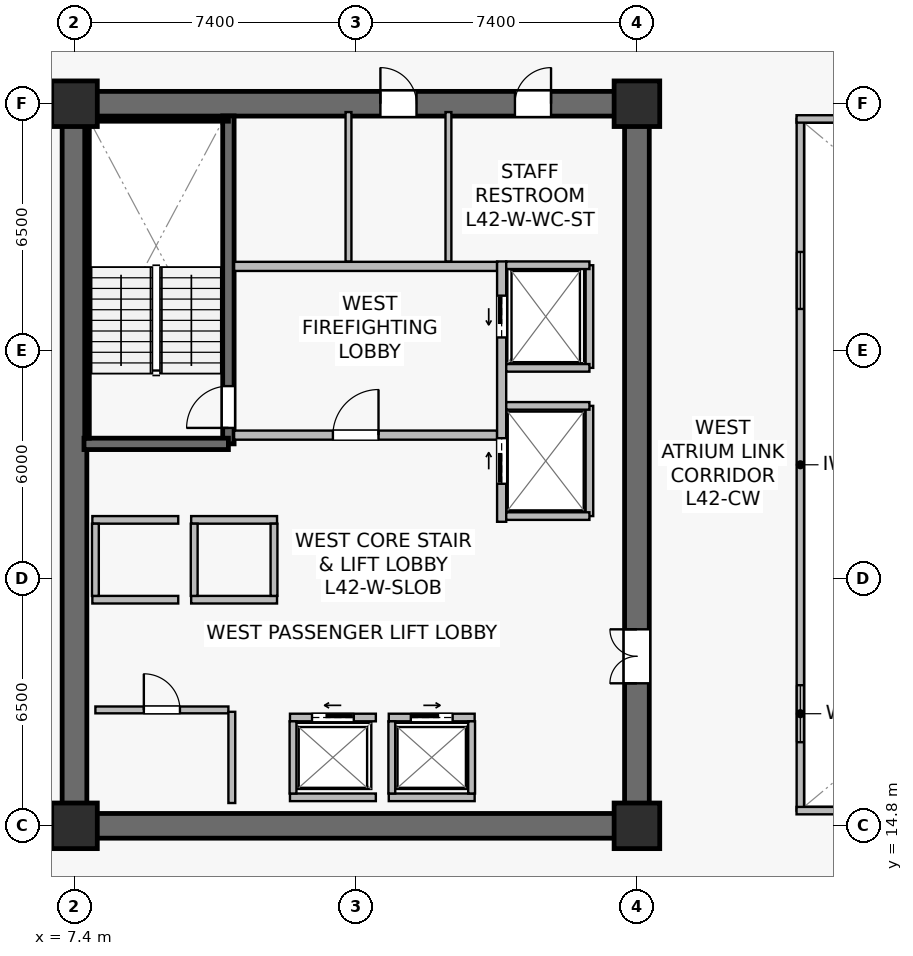
"""IFC4 building model, lengths in metres.
Left out: names, types, materials, properties, quantities, classifications, styles, units other than length and angle.
Written with IfcOpenShell. Run it as: python <this file> out.ifc"""

import sys

from ifc_helpers import new_model, si_unit, direction, frame, frame_2d, origin, origin_2d, place, context, subcontext, project, spatial, rectangle, extrude, source, transform, mapped, element, fill, save


model = new_model("IFC4")
c1 = context("Model", 3, precision=1e-05, world=origin(), true_north=direction((0.0, 1.0)))
c2 = subcontext(c1, "Body", "Model", "MODEL_VIEW")
j1 = project(units=[si_unit("LENGTHUNIT", "METRE"), si_unit("PLANEANGLEUNIT", "RADIAN")], contexts=[c1])
p1 = place(None, origin())
s1 = spatial("IfcSite", under=j1, at=p1, CompositionType="ELEMENT")
p2 = place(p1, origin())
s2 = spatial("IfcBuilding", under=s1, at=p2, CompositionType="ELEMENT")
p3 = place(p2, frame((0.0, 0.0, 174.8)))
s3 = spatial("IfcBuildingStorey", under=s2, at=p3, CompositionType="ELEMENT", Elevation=174.8)
p4 = place(p3, frame((7.075, 14.8, 0.0), z_axis=(0.0, 0.0, 1.0), x_axis=(1.0, 0.0, 0.0)))
e1 = element("IfcWall", 1, at=p4, inside=s3, PredefinedType="SHEAR", context=c2, shape_type="SweptSolid", body=[
    extrude(rectangle(XDim=15.45, YDim=0.65, at=frame_2d((7.725, 0.0))), origin(), (0.0, 0.0, 1.0), 3.79),
])
p5 = place(p3, frame((7.075, 33.8, 0.0), z_axis=(0.0, 0.0, 1.0), x_axis=(1.0, 0.0, 0.0)))
e2 = element("IfcWall", 2, at=p5, inside=s3, PredefinedType="SHEAR", context=c2, shape_type="SweptSolid", body=[
    extrude(rectangle(XDim=15.45, YDim=0.65, at=frame_2d((7.725, 0.0))), origin(), (0.0, 0.0, 1.0), 3.79),
])
p6 = place(p5, frame((8.375, 0.0, 0.0)))
e3 = element("IfcOpeningElement", 3, at=p6, cuts=e2, PredefinedType="OPENING", context=c2, shape_type="SweptSolid", body=[
    extrude(rectangle(XDim=0.95, YDim=2.15, at=frame_2d((0.475, 1.075))), frame((0.0, 0.335, 0.0), z_axis=(0.0, -1.0, 0.0), x_axis=(1.0, 0.0, 0.0)), (0.0, 0.0, 1.0), 0.67),
])
p7 = place(p5, frame((11.915, 0.0, 0.0)))
e4 = element("IfcOpeningElement", 4, at=p7, cuts=e2, PredefinedType="OPENING", context=c2, shape_type="SweptSolid", body=[
    extrude(rectangle(XDim=0.95, YDim=2.15, at=frame_2d((0.475, 1.075))), frame((0.0, 0.335, 0.0), z_axis=(0.0, -1.0, 0.0), x_axis=(1.0, 0.0, 0.0)), (0.0, 0.0, 1.0), 0.67),
])
p8 = place(p3, frame((7.4, 15.125, 0.0), z_axis=(0.0, 0.0, 1.0), x_axis=(0.0, 1.0, 0.0)))
e5 = element("IfcWall", 5, at=p8, inside=s3, PredefinedType="SHEAR", context=c2, shape_type="SweptSolid", body=[
    extrude(rectangle(XDim=18.35, YDim=0.65, at=frame_2d((9.175, 0.0))), origin(), (0.0, 0.0, 1.0), 3.79),
])
p9 = place(p3, frame((22.2, 15.125, 0.0), z_axis=(0.0, 0.0, 1.0), x_axis=(0.0, 1.0, 0.0)))
e6 = element("IfcWall", 6, at=p9, inside=s3, PredefinedType="SHEAR", context=c2, shape_type="SweptSolid", body=[
    extrude(rectangle(XDim=18.35, YDim=0.65, at=frame_2d((9.175, 0.0))), origin(), (0.0, 0.0, 1.0), 3.79),
])
p10 = place(p9, frame((3.425, 0.0, 0.0)))
e7 = element("IfcOpeningElement", 7, at=p10, cuts=e6, PredefinedType="OPENING", context=c2, shape_type="SweptSolid", body=[
    extrude(rectangle(XDim=1.42, YDim=2.2, at=frame_2d((0.71, 1.1))), frame((0.0, 0.335, 0.0), z_axis=(0.0, -1.0, 0.0), x_axis=(1.0, 0.0, 0.0)), (0.0, 0.0, 1.0), 0.67),
])
p11 = place(p3, frame((11.45, 24.85, 0.0), z_axis=(0.0, 0.0, 1.0), x_axis=(0.0, 1.0, 0.0)))
e8 = element("IfcWall", 8, at=p11, inside=s3, PredefinedType="SHEAR", context=c2, shape_type="SweptSolid", body=[
    extrude(rectangle(XDim=8.63, YDim=0.3, at=frame_2d((4.315, 0.0))), origin(), (0.0, 0.0, 1.0), 3.79),
])
p12 = place(p11, frame((0.42, 0.0, 0.0)))
e9 = element("IfcOpeningElement", 9, at=p12, cuts=e8, PredefinedType="OPENING", context=c2, shape_type="SweptSolid", body=[
    extrude(rectangle(XDim=1.1, YDim=2.15, at=frame_2d((0.55, 1.075))), frame((0.0, 0.16, 0.0), z_axis=(0.0, -1.0, 0.0), x_axis=(1.0, 0.0, 0.0)), (0.0, 0.0, 1.0), 0.32),
])
p13 = place(p3, frame((7.65, 24.85, 0.0), z_axis=(0.0, 0.0, 1.0), x_axis=(1.0, 0.0, 0.0)))
e10 = element("IfcWall", 10, at=p13, inside=s3, PredefinedType="SHEAR", context=c2, shape_type="SweptSolid", body=[
    extrude(rectangle(XDim=3.8, YDim=0.3, at=frame_2d((1.9, 0.0))), origin(), (0.0, 0.0, 1.0), 3.79),
])
p14 = place(p3, frame((7.73, 33.4, 0.0), z_axis=(0.0, 0.0, 1.0), x_axis=(1.0, 0.0, 0.0)))
e11 = element("IfcWall", 11, at=p14, inside=s3, PredefinedType="SOLIDWALL", context=c2, shape_type="SweptSolid", body=[
    extrude(rectangle(XDim=3.72, YDim=0.12, at=frame_2d((1.86, 0.0))), origin(), (0.0, 0.0, 1.0), 3.79),
])
p15 = place(p3, frame((7.73, 25.0, 0.0), z_axis=(0.0, 0.0, 1.0), x_axis=(0.0, 1.0, 0.0)))
e12 = element("IfcWall", 12, at=p15, inside=s3, PredefinedType="SOLIDWALL", context=c2, shape_type="SweptSolid", body=[
    extrude(rectangle(XDim=8.32, YDim=0.12, at=frame_2d((4.16, 0.0))), origin(), (0.0, 0.0, 1.0), 3.79),
])
m1 = source(origin(), c2, "Body", "SweptSolid", [
    extrude(rectangle(XDim=1.2, YDim=1.2, at=origin_2d()), origin(), (0.0, 0.0, 1.0), 4.1),
])
for number, where, z_axis, x_axis in (
    (13, (7.4, 14.8, 0.0), (0.0, 0.0, 1.0), (1.0, 0.0, 0.0)),
    (14, (22.2, 14.8, 0.0), (0.0, 0.0, 1.0), (1.0, 0.0, 0.0)),
    (15, (7.4, 33.8, 0.0), (0.0, 0.0, 1.0), (1.0, 0.0, 0.0)),
    (16, (22.2, 33.8, 0.0), (0.0, 0.0, 1.0), (1.0, 0.0, 0.0)),
):
    element("IfcColumn", number, at=place(p3, frame(where, z_axis=z_axis, x_axis=x_axis)), inside=s3, PredefinedType="COLUMN", context=c2, shape_type="MappedRepresentation", body=[
        mapped(m1, transform((0.0, 0.0, 0.0), scale=1.0)),
    ])
p16 = place(p3, frame((11.6, 25.08, 0.0), z_axis=(0.0, 0.0, 1.0), x_axis=(1.0, 0.0, 0.0)))
e17 = element("IfcWall", 17, at=p16, inside=s3, PredefinedType="SOLIDWALL", context=c2, shape_type="SweptSolid", body=[
    extrude(rectangle(XDim=6.92, YDim=0.24, at=frame_2d((3.46, 0.0))), origin(), (0.0, 0.0, 1.0), 3.187),
])
p17 = place(p16, frame((2.6, 0.0, 0.0)))
e18 = element("IfcOpeningElement", 18, at=p17, cuts=e17, PredefinedType="OPENING", context=c2, shape_type="SweptSolid", body=[
    extrude(rectangle(XDim=1.2, YDim=2.16, at=frame_2d((0.6, 1.08))), frame((0.0, 0.13, 0.0), z_axis=(0.0, -1.0, 0.0), x_axis=(1.0, 0.0, 0.0)), (0.0, 0.0, 1.0), 0.26),
])
p18 = place(p3, frame((11.6, 29.52, 0.0), z_axis=(0.0, 0.0, 1.0), x_axis=(1.0, 0.0, 0.0)))
e19 = element("IfcWall", 19, at=p18, inside=s3, PredefinedType="SOLIDWALL", context=c2, shape_type="SweptSolid", body=[
    extrude(rectangle(XDim=6.92, YDim=0.24, at=frame_2d((3.46, 0.0))), origin(), (0.0, 0.0, 1.0), 3.187),
])
p19 = place(p3, frame((18.64, 22.8, 0.0), z_axis=(0.0, 0.0, 1.0), x_axis=(0.0, 1.0, 0.0)))
e20 = element("IfcWall", 20, at=p19, inside=s3, PredefinedType="SOLIDWALL", context=c2, shape_type="SweptSolid", body=[
    extrude(rectangle(XDim=6.85, YDim=0.24, at=frame_2d((3.425, 0.0))), origin(), (0.0, 0.0, 1.0), 2.925),
])
p20 = place(p19, frame((4.85, 0.0, 0.0)))
e21 = element("IfcOpeningElement", 21, at=p20, cuts=e20, PredefinedType="OPENING", context=c2, shape_type="SweptSolid", body=[
    extrude(rectangle(XDim=1.1, YDim=2.22, at=frame_2d((0.55, 1.11))), frame((0.0, 0.13, 0.0), z_axis=(0.0, -1.0, 0.0), x_axis=(1.0, 0.0, 0.0)), (0.0, 0.0, 1.0), 0.26),
])
p21 = place(p19, frame((1.0, 0.0, 0.0)))
e22 = element("IfcOpeningElement", 22, at=p21, cuts=e20, PredefinedType="OPENING", context=c2, shape_type="SweptSolid", body=[
    extrude(rectangle(XDim=1.2, YDim=2.22, at=frame_2d((0.6, 1.11))), frame((0.0, 0.13, 0.0), z_axis=(0.0, -1.0, 0.0), x_axis=(1.0, 0.0, 0.0)), (0.0, 0.0, 1.0), 0.26),
])
p22 = place(p3, frame((13.07, 17.65, 0.0), z_axis=(0.0, 0.0, 1.0), x_axis=(1.0, 0.0, 0.0)))
e23 = element("IfcWall", 23, at=p22, inside=s3, PredefinedType="SOLIDWALL", context=c2, shape_type="SweptSolid", body=[
    extrude(rectangle(XDim=2.26, YDim=0.2, at=frame_2d((1.13, 0.0))), origin(), (0.0, 0.0, 1.0), 3.187),
])
p23 = place(p22, frame((0.58, 0.0, 0.0)))
e24 = element("IfcOpeningElement", 24, at=p23, cuts=e23, PredefinedType="OPENING", context=c2, shape_type="SweptSolid", body=[
    extrude(rectangle(XDim=1.1, YDim=2.22, at=frame_2d((0.55, 1.11))), frame((0.0, 0.11, 0.0), z_axis=(0.0, -1.0, 0.0), x_axis=(1.0, 0.0, 0.0)), (0.0, 0.0, 1.0), 0.22),
])
p24 = place(p3, frame((13.07, 15.55, 0.0), z_axis=(0.0, 0.0, 1.0), x_axis=(1.0, 0.0, 0.0)))
e25 = element("IfcWall", 25, at=p24, inside=s3, PredefinedType="SOLIDWALL", context=c2, shape_type="SweptSolid", body=[
    extrude(rectangle(XDim=2.26, YDim=0.2, at=frame_2d((1.13, 0.0))), origin(), (0.0, 0.0, 1.0), 3.187),
])
p25 = place(p3, frame((13.15, 15.65, 0.0), z_axis=(0.0, 0.0, 1.0), x_axis=(0.0, 1.0, 0.0)))
e26 = element("IfcWall", 26, at=p25, inside=s3, PredefinedType="SOLIDWALL", context=c2, shape_type="SweptSolid", body=[
    extrude(rectangle(XDim=1.9, YDim=0.18, at=frame_2d((0.95, 0.0))), origin(), (0.0, 0.0, 1.0), 3.79),
])
p26 = place(p3, frame((15.67, 17.65, 0.0), z_axis=(0.0, 0.0, 1.0), x_axis=(1.0, 0.0, 0.0)))
e27 = element("IfcWall", 27, at=p26, inside=s3, PredefinedType="SOLIDWALL", context=c2, shape_type="SweptSolid", body=[
    extrude(rectangle(XDim=2.26, YDim=0.2, at=frame_2d((1.13, 0.0))), origin(), (0.0, 0.0, 1.0), 3.79),
])
p27 = place(p26, frame((0.58, 0.0, 0.0)))
e28 = element("IfcOpeningElement", 28, at=p27, cuts=e27, PredefinedType="OPENING", context=c2, shape_type="SweptSolid", body=[
    extrude(rectangle(XDim=1.1, YDim=2.22, at=frame_2d((0.55, 1.11))), frame((0.0, 0.11, 0.0), z_axis=(0.0, -1.0, 0.0), x_axis=(1.0, 0.0, 0.0)), (0.0, 0.0, 1.0), 0.22),
])
p28 = place(p3, frame((15.67, 15.55, 0.0), z_axis=(0.0, 0.0, 1.0), x_axis=(1.0, 0.0, 0.0)))
e29 = element("IfcWall", 29, at=p28, inside=s3, PredefinedType="SOLIDWALL", context=c2, shape_type="SweptSolid", body=[
    extrude(rectangle(XDim=2.26, YDim=0.2, at=frame_2d((1.13, 0.0))), origin(), (0.0, 0.0, 1.0), 3.79),
])
for number, where, z_axis, x_axis in (
    (30, (15.75, 15.65, 0.0), (0.0, 0.0, 1.0), (0.0, 1.0, 0.0)),
    (31, (17.85, 15.65, 0.0), (0.0, 0.0, 1.0), (0.0, 1.0, 0.0)),
):
    element("IfcWall", number, at=place(p3, frame(where, z_axis=z_axis, x_axis=x_axis)), inside=s3, PredefinedType="SOLIDWALL", context=c2, shape_type="SweptSolid", body=[
        extrude(rectangle(XDim=1.9, YDim=0.18, at=frame_2d((0.95, 0.0))), origin(), (0.0, 0.0, 1.0), 3.79),
    ])
for number, where, z_axis, x_axis in (
    (32, (7.87, 20.75, 0.0), (0.0, 0.0, 1.0), (1.0, 0.0, 0.0)),
    (33, (7.87, 22.85, 0.0), (0.0, 0.0, 1.0), (1.0, 0.0, 0.0)),
):
    element("IfcWall", number, at=place(p3, frame(where, z_axis=z_axis, x_axis=x_axis)), inside=s3, PredefinedType="SOLIDWALL", context=c2, shape_type="SweptSolid", body=[
        extrude(rectangle(XDim=2.26, YDim=0.2, at=frame_2d((1.13, 0.0))), origin(), (0.0, 0.0, 1.0), 3.79),
    ])
p29 = place(p3, frame((7.95, 20.85, 0.0), z_axis=(0.0, 0.0, 1.0), x_axis=(0.0, 1.0, 0.0)))
e34 = element("IfcWall", 34, at=p29, inside=s3, PredefinedType="SOLIDWALL", context=c2, shape_type="SweptSolid", body=[
    extrude(rectangle(XDim=1.9, YDim=0.18, at=frame_2d((0.95, 0.0))), origin(), (0.0, 0.0, 1.0), 3.79),
])
for number, where, z_axis, x_axis in (
    (35, (10.47, 20.75, 0.0), (0.0, 0.0, 1.0), (1.0, 0.0, 0.0)),
    (36, (10.47, 22.85, 0.0), (0.0, 0.0, 1.0), (1.0, 0.0, 0.0)),
):
    element("IfcWall", number, at=place(p3, frame(where, z_axis=z_axis, x_axis=x_axis)), inside=s3, PredefinedType="SOLIDWALL", context=c2, shape_type="SweptSolid", body=[
        extrude(rectangle(XDim=2.26, YDim=0.2, at=frame_2d((1.13, 0.0))), origin(), (0.0, 0.0, 1.0), 3.79),
    ])
for number, where, z_axis, x_axis in (
    (37, (10.55, 20.85, 0.0), (0.0, 0.0, 1.0), (0.0, 1.0, 0.0)),
    (38, (12.65, 20.85, 0.0), (0.0, 0.0, 1.0), (0.0, 1.0, 0.0)),
):
    element("IfcWall", number, at=place(p3, frame(where, z_axis=z_axis, x_axis=x_axis)), inside=s3, PredefinedType="SOLIDWALL", context=c2, shape_type="SweptSolid", body=[
        extrude(rectangle(XDim=1.9, YDim=0.18, at=frame_2d((0.95, 0.0))), origin(), (0.0, 0.0, 1.0), 3.79),
    ])
p30 = place(p3, frame((20.95, 26.85, 0.0), z_axis=(0.0, 0.0, 1.0), x_axis=(0.0, 1.0, 0.0)))
e39 = element("IfcWall", 39, at=p30, inside=s3, PredefinedType="SOLIDWALL", context=c2, shape_type="SweptSolid", body=[
    extrude(rectangle(XDim=2.7, YDim=0.2, at=frame_2d((1.35, 0.0))), origin(), (0.0, 0.0, 1.0), 3.79),
])
p31 = place(p3, frame((18.76, 29.55, 0.0), z_axis=(0.0, 0.0, 1.0), x_axis=(1.0, 0.0, 0.0)))
e40 = element("IfcWall", 40, at=p31, inside=s3, PredefinedType="SOLIDWALL", context=c2, shape_type="SweptSolid", body=[
    extrude(rectangle(XDim=2.19, YDim=0.2, at=frame_2d((1.095, 0.0))), origin(), (0.0, 0.0, 1.0), 3.79),
])
p32 = place(p3, frame((18.76, 26.85, 0.0), z_axis=(0.0, 0.0, 1.0), x_axis=(1.0, 0.0, 0.0)))
e41 = element("IfcWall", 41, at=p32, inside=s3, PredefinedType="SOLIDWALL", context=c2, shape_type="SweptSolid", body=[
    extrude(rectangle(XDim=2.19, YDim=0.2, at=frame_2d((1.095, 0.0))), origin(), (0.0, 0.0, 1.0), 3.187),
])
p33 = place(p3, frame((20.95, 22.95, 0.0), z_axis=(0.0, 0.0, 1.0), x_axis=(0.0, 1.0, 0.0)))
e42 = element("IfcWall", 42, at=p33, inside=s3, PredefinedType="SOLIDWALL", context=c2, shape_type="SweptSolid", body=[
    extrude(rectangle(XDim=2.9, YDim=0.2, at=frame_2d((1.45, 0.0))), origin(), (0.0, 0.0, 1.0), 2.925),
])
for number, where, z_axis, x_axis in (
    (43, (18.76, 25.85, 0.0), (0.0, 0.0, 1.0), (1.0, 0.0, 0.0)),
    (44, (18.76, 22.95, 0.0), (0.0, 0.0, 1.0), (1.0, 0.0, 0.0)),
):
    element("IfcWall", number, at=place(p3, frame(where, z_axis=z_axis, x_axis=x_axis)), inside=s3, PredefinedType="SOLIDWALL", context=c2, shape_type="SweptSolid", body=[
        extrude(rectangle(XDim=2.19, YDim=0.2, at=frame_2d((1.095, 0.0))), origin(), (0.0, 0.0, 1.0), 3.79),
    ])
p34 = place(p3, frame((7.95, 17.85, 0.0), z_axis=(0.0, 0.0, 1.0), x_axis=(1.0, 0.0, 0.0)))
e45 = element("IfcWall", 45, at=p34, inside=s3, PredefinedType="SOLIDWALL", context=c2, shape_type="SweptSolid", body=[
    extrude(rectangle(XDim=3.5, YDim=0.18, at=frame_2d((1.75, 0.0))), origin(), (0.0, 0.0, 1.0), 3.79),
])
p35 = place(p34, frame((1.275, 0.0, 0.0)))
e46 = element("IfcOpeningElement", 46, at=p35, cuts=e45, PredefinedType="OPENING", context=c2, shape_type="SweptSolid", body=[
    extrude(rectangle(XDim=0.95, YDim=2.15, at=frame_2d((0.475, 1.075))), frame((0.0, 0.1, 0.0), z_axis=(0.0, -1.0, 0.0), x_axis=(1.0, 0.0, 0.0)), (0.0, 0.0, 1.0), 0.2),
])
p36 = place(p3, frame((11.54, 15.4, 0.0), z_axis=(0.0, 0.0, 1.0), x_axis=(0.0, 1.0, 0.0)))
e47 = element("IfcWall", 47, at=p36, inside=s3, PredefinedType="SOLIDWALL", context=c2, shape_type="SweptSolid", body=[
    extrude(rectangle(XDim=2.4, YDim=0.18, at=frame_2d((1.2, 0.0))), origin(), (0.0, 0.0, 1.0), 3.79),
])
p37 = place(p3, frame((14.61, 29.65, 0.0), z_axis=(0.0, 0.0, 1.0), x_axis=(0.0, 1.0, 0.0)))
e48 = element("IfcWall", 48, at=p37, inside=s3, PredefinedType="PLUMBINGWALL", context=c2, shape_type="SweptSolid", body=[
    extrude(rectangle(XDim=3.93, YDim=0.155, at=frame_2d((1.965, 0.0))), origin(), (0.0, 0.0, 1.0), 3.187),
])
p38 = place(p3, frame((17.24, 29.65, 0.0), z_axis=(0.0, 0.0, 1.0), x_axis=(0.0, 1.0, 0.0)))
e49 = element("IfcWall", 49, at=p38, inside=s3, PredefinedType="PLUMBINGWALL", context=c2, shape_type="SweptSolid", body=[
    extrude(rectangle(XDim=3.93, YDim=0.155, at=frame_2d((1.965, 0.0))), origin(), (0.0, 0.0, 1.0), 3.79),
])
p39 = place(p3, frame((26.5, 15.2, 0.0), z_axis=(0.0, 0.0, 1.0), x_axis=(0.0, 1.0, 0.0)))
e50 = element("IfcWall", 50, at=p39, inside=s3, PredefinedType="SOLIDWALL", context=c2, shape_type="SweptSolid", body=[
    extrude(rectangle(XDim=18.2, YDim=0.195, at=frame_2d((9.1, 0.0))), origin(), (0.0, 0.0, 1.0), 3.79),
])
p40 = place(p39, frame((1.8, 0.0, 0.9)))
e51 = element("IfcOpeningElement", 51, at=p40, cuts=e50, PredefinedType="OPENING", context=c2, shape_type="SweptSolid", body=[
    extrude(rectangle(XDim=1.5, YDim=1.4, at=frame_2d((0.75, 0.7))), frame((0.0, 0.107, 0.0), z_axis=(0.0, -1.0, 0.0), x_axis=(1.0, 0.0, 0.0)), (0.0, 0.0, 1.0), 0.215),
])
p41 = place(p39, frame((13.2, 0.0, 0.9)))
e52 = element("IfcOpeningElement", 52, at=p41, cuts=e50, PredefinedType="OPENING", context=c2, shape_type="SweptSolid", body=[
    extrude(rectangle(XDim=1.5, YDim=1.4, at=frame_2d((0.75, 0.7))), frame((0.0, 0.107, 0.0), z_axis=(0.0, -1.0, 0.0), x_axis=(1.0, 0.0, 0.0)), (0.0, 0.0, 1.0), 0.215),
])
for number, where, z_axis, x_axis in (
    (53, (26.4, 15.2, 0.0), (0.0, 0.0, 1.0), (1.0, 0.0, 0.0)),
    (54, (26.4, 33.4, 0.0), (0.0, 0.0, 1.0), (1.0, 0.0, 0.0)),
):
    element("IfcWall", number, at=place(p3, frame(where, z_axis=z_axis, x_axis=x_axis)), inside=s3, PredefinedType="SOLIDWALL", context=c2, shape_type="SweptSolid", body=[
        extrude(rectangle(XDim=22.0, YDim=0.195, at=frame_2d((11.0, 0.0))), origin(), (0.0, 0.0, 1.0), 3.79),
    ])
m2 = source(origin(), c2, "Body", "SweptSolid", [
    extrude(rectangle(XDim=1.5, YDim=1.4, at=frame_2d((0.75, 0.7))), frame((0.0, 0.03, 0.0), z_axis=(0.0, -1.0, 0.0), x_axis=(1.0, 0.0, 0.0)), (0.0, 0.0, 1.0), 0.06),
])
p42 = place(p40, origin())
e55 = element("IfcWindow", 55, at=p42, inside=s3, PartitioningType="SINGLE_PANEL", PredefinedType="WINDOW", context=c2, shape_type="MappedRepresentation", body=[
    mapped(m2, transform((0.0, 0.0, 0.0), scale=1.0)),
])
fill(e51, e55)
p43 = place(p41, origin())
e56 = element("IfcWindow", 56, at=p43, inside=s3, PartitioningType="SINGLE_PANEL", PredefinedType="WINDOW", context=c2, shape_type="MappedRepresentation", body=[
    mapped(m2, transform((0.0, 0.0, 0.0), scale=1.0)),
])
fill(e52, e56)
m3 = source(origin(), c2, "Body", "SweptSolid", [
    extrude(rectangle(XDim=1.1, YDim=2.15, at=frame_2d((0.55, 1.075))), frame((0.0, 0.025, 0.0), z_axis=(0.0, -1.0, 0.0), x_axis=(1.0, 0.0, 0.0)), (0.0, 0.0, 1.0), 0.05),
])
p44 = place(p12, origin())
e57 = element("IfcDoor", 57, at=p44, inside=s3, OperationType="SINGLE_SWING_LEFT", PredefinedType="DOOR", context=c2, shape_type="MappedRepresentation", body=[
    mapped(m3, transform((0.0, 0.0, 0.0), scale=1.0)),
])
fill(e9, e57)
m4 = source(origin(), c2, "Body", "SweptSolid", [
    extrude(rectangle(XDim=1.2, YDim=2.16, at=frame_2d((0.6, 1.08))), frame((0.0, 0.025, 0.0), z_axis=(0.0, -1.0, 0.0), x_axis=(1.0, 0.0, 0.0)), (0.0, 0.0, 1.0), 0.05),
])
p45 = place(p17, origin())
e58 = element("IfcDoor", 58, at=p45, inside=s3, OperationType="SINGLE_SWING_RIGHT", PredefinedType="DOOR", context=c2, shape_type="MappedRepresentation", body=[
    mapped(m4, transform((0.0, 0.0, 0.0), scale=1.0)),
])
fill(e18, e58)
m5 = source(origin(), c2, "Body", "SweptSolid", [
    extrude(rectangle(XDim=1.1, YDim=2.22, at=frame_2d((0.55, 1.11))), frame((0.0, 0.025, 0.0), z_axis=(0.0, -1.0, 0.0), x_axis=(1.0, 0.0, 0.0)), (0.0, 0.0, 1.0), 0.05),
])
p46 = place(p23, origin())
e59 = element("IfcDoor", 59, at=p46, inside=s3, OperationType="SLIDING_TO_LEFT", PredefinedType="USERDEFINED", context=c2, shape_type="MappedRepresentation", body=[
    mapped(m5, transform((0.0, 0.0, 0.0), scale=1.0)),
])
fill(e24, e59)
p47 = place(p27, origin())
e60 = element("IfcDoor", 60, at=p47, inside=s3, OperationType="SLIDING_TO_RIGHT", PredefinedType="USERDEFINED", context=c2, shape_type="MappedRepresentation", body=[
    mapped(m5, transform((0.0, 0.0, 0.0), scale=1.0)),
])
fill(e28, e60)
p48 = place(p20, origin())
e61 = element("IfcDoor", 61, at=p48, inside=s3, OperationType="SLIDING_TO_LEFT", PredefinedType="USERDEFINED", context=c2, shape_type="MappedRepresentation", body=[
    mapped(m5, transform((0.0, 0.0, 0.0), scale=1.0)),
])
fill(e21, e61)
m6 = source(origin(), c2, "Body", "SweptSolid", [
    extrude(rectangle(XDim=1.2, YDim=2.22, at=frame_2d((0.6, 1.11))), frame((0.0, 0.025, 0.0), z_axis=(0.0, -1.0, 0.0), x_axis=(1.0, 0.0, 0.0)), (0.0, 0.0, 1.0), 0.05),
])
p49 = place(p21, origin())
e62 = element("IfcDoor", 62, at=p49, inside=s3, OperationType="SLIDING_TO_RIGHT", PredefinedType="USERDEFINED", context=c2, shape_type="MappedRepresentation", body=[
    mapped(m6, transform((0.0, 0.0, 0.0), scale=1.0)),
])
fill(e22, e62)
m7 = source(origin(), c2, "Body", "SweptSolid", [
    extrude(rectangle(XDim=0.95, YDim=2.15, at=frame_2d((0.475, 1.075))), frame((0.0, 0.025, 0.0), z_axis=(0.0, -1.0, 0.0), x_axis=(1.0, 0.0, 0.0)), (0.0, 0.0, 1.0), 0.05),
])
p50 = place(p35, origin())
e63 = element("IfcDoor", 63, at=p50, inside=s3, OperationType="SINGLE_SWING_LEFT", PredefinedType="DOOR", context=c2, shape_type="MappedRepresentation", body=[
    mapped(m7, transform((0.0, 0.0, 0.0), scale=1.0)),
])
fill(e46, e63)
m8 = source(origin(), c2, "Body", "SweptSolid", [
    extrude(rectangle(XDim=1.42, YDim=2.2, at=frame_2d((0.71, 1.1))), frame((0.0, 0.025, 0.0), z_axis=(0.0, -1.0, 0.0), x_axis=(1.0, 0.0, 0.0)), (0.0, 0.0, 1.0), 0.05),
])
p51 = place(p10, origin())
e64 = element("IfcDoor", 64, at=p51, inside=s3, OperationType="DOUBLE_DOOR_SINGLE_SWING", PredefinedType="DOOR", context=c2, shape_type="MappedRepresentation", body=[
    mapped(m8, transform((0.0, 0.0, 0.0), scale=1.0)),
])
fill(e7, e64)
p52 = place(p6, origin())
e65 = element("IfcDoor", 65, at=p52, inside=s3, OperationType="SINGLE_SWING_LEFT", PredefinedType="DOOR", context=c2, shape_type="MappedRepresentation", body=[
    mapped(m7, transform((0.0, 0.0, 0.0), scale=1.0)),
])
fill(e3, e65)
p53 = place(p7, origin())
e66 = element("IfcDoor", 66, at=p53, inside=s3, OperationType="SINGLE_SWING_RIGHT", PredefinedType="DOOR", context=c2, shape_type="MappedRepresentation", body=[
    mapped(m7, transform((0.0, 0.0, 0.0), scale=1.0)),
])
fill(e4, e66)
save(model, sys.argv[1])
